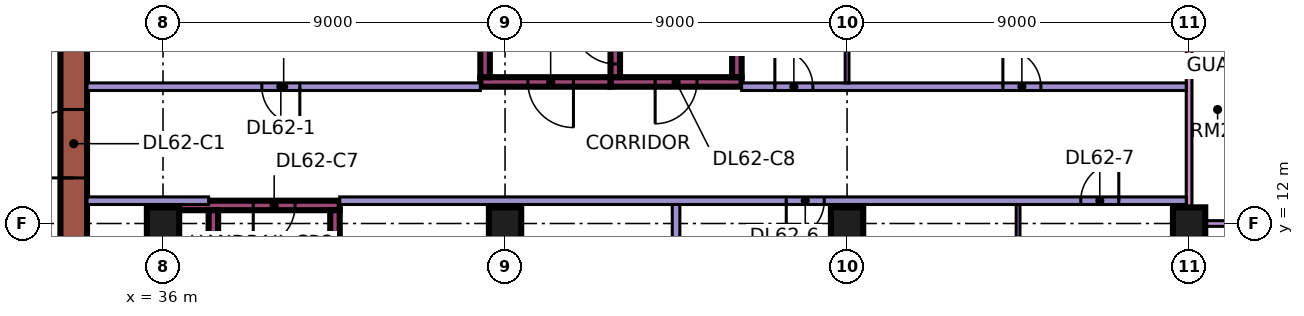
"""IFC4 building model, lengths in metres.
Left out: names, types, materials, properties, quantities, classifications, styles, units other than length and angle.
Written with IfcOpenShell. Run it as: python <this file> out.ifc"""

import sys

from ifc_helpers import new_model, si_unit, direction, frame, frame_2d, origin, origin_2d, place, context, subcontext, project, spatial, rectangle, extrude, element, fill, save


model = new_model("IFC4")
c1 = context("Model", 3, precision=1e-05, world=origin(), true_north=direction((0.0, 1.0)))
c2 = subcontext(c1, "Body", "Model", "MODEL_VIEW")
j1 = project(units=[si_unit("LENGTHUNIT", "METRE"), si_unit("PLANEANGLEUNIT", "RADIAN")], contexts=[c1])
p1 = place(None, origin())
s1 = spatial("IfcSite", under=j1, at=p1, CompositionType="ELEMENT")
p2 = place(p1, origin())
s2 = spatial("IfcBuilding", under=s1, at=p2, CompositionType="ELEMENT")
p3 = place(p2, frame((0.0, 0.0, 262.15)))
s3 = spatial("IfcBuildingStorey", under=s2, at=p3, CompositionType="ELEMENT", Elevation=262.15)
for number, where, z_axis, x_axis in (
    (1, (36.0, 12.0, 0.0), (0.0, 0.0, 1.0), (1.0, 0.0, 0.0)),
    (2, (45.0, 12.0, 0.0), (0.0, 0.0, 1.0), (1.0, 0.0, 0.0)),
    (3, (54.0, 12.0, 0.0), (0.0, 0.0, 1.0), (1.0, 0.0, 0.0)),
    (4, (63.0, 12.0, 0.0), (0.0, 0.0, 1.0), (1.0, 0.0, 0.0)),
):
    element("IfcColumn", number, at=place(p3, frame(where, z_axis=z_axis, x_axis=x_axis)), inside=s3, PredefinedType="COLUMN", context=c2, shape_type="SweptSolid", body=[
        extrude(rectangle(XDim=0.85, YDim=0.85, at=origin_2d()), origin(), (0.0, 0.0, 1.0), 11.25),
    ])
p4 = place(p3, frame((33.65, 7.7, 0.0), z_axis=(0.0, 0.0, 1.0), x_axis=(0.0, 1.0, 0.0)))
e5 = element("IfcWall", 5, at=p4, inside=s3, PredefinedType="SHEAR", context=c2, shape_type="SweptSolid", body=[
    extrude(rectangle(XDim=11.6, YDim=0.7, at=frame_2d((5.8, 0.0))), origin(), (0.0, 0.0, 1.0), 11.25),
])
p5 = place(p4, frame((5.5, 0.0, 0.0)))
e6 = element("IfcOpeningElement", 6, at=p5, cuts=e5, PredefinedType="OPENING", context=c2, shape_type="SweptSolid", body=[
    extrude(rectangle(XDim=1.8, YDim=2.4, at=frame_2d((0.9, 1.2))), frame((0.0, 0.36, 0.0), z_axis=(0.0, -1.0, 0.0), x_axis=(1.0, 0.0, 0.0)), (0.0, 0.0, 1.0), 0.72),
])
p6 = place(p3, frame((36.425, 12.475, 0.0), z_axis=(0.0, 0.0, 1.0), x_axis=(1.0, 0.0, 0.0)))
e7 = element("IfcWall", 7, at=p6, inside=s3, PredefinedType="SHEAR", context=c2, shape_type="SweptSolid", body=[
    extrude(rectangle(XDim=4.225, YDim=0.25, at=frame_2d((2.112, 0.0))), origin(), (0.0, 0.0, 1.0), 11.25),
])
p7 = place(p6, frame((1.95, 0.0, 0.0)))
e8 = element("IfcOpeningElement", 8, at=p7, cuts=e7, PredefinedType="OPENING", context=c2, shape_type="SweptSolid", body=[
    extrude(rectangle(XDim=1.1, YDim=2.2, at=frame_2d((0.55, 1.1))), frame((0.0, 0.135, 0.0), z_axis=(0.0, -1.0, 0.0), x_axis=(1.0, 0.0, 0.0)), (0.0, 0.0, 1.0), 0.27),
])
for number, where, z_axis, x_axis in (
    (9, (37.325, 5.85, 0.0), (0.0, 0.0, 1.0), (0.0, 1.0, 0.0)),
    (10, (40.525, 5.85, 0.0), (0.0, 0.0, 1.0), (0.0, 1.0, 0.0)),
):
    element("IfcWall", number, at=place(p3, frame(where, z_axis=z_axis, x_axis=x_axis)), inside=s3, PredefinedType="SHEAR", context=c2, shape_type="SweptSolid", body=[
        extrude(rectangle(XDim=6.5, YDim=0.25, at=frame_2d((3.25, 0.0))), origin(), (0.0, 0.0, 1.0), 11.25),
    ])
p8 = place(p3, frame((47.775, 15.725, 0.0), z_axis=(0.0, 0.0, 1.0), x_axis=(1.0, 0.0, 0.0)))
e11 = element("IfcWall", 11, at=p8, inside=s3, PredefinedType="SHEAR", context=c2, shape_type="SweptSolid", body=[
    extrude(rectangle(XDim=3.45, YDim=0.25, at=frame_2d((1.725, 0.0))), origin(), (0.0, 0.0, 1.0), 11.25),
])
p9 = place(p8, frame((1.175, 0.0, 0.0)))
e12 = element("IfcOpeningElement", 12, at=p9, cuts=e11, PredefinedType="OPENING", context=c2, shape_type="SweptSolid", body=[
    extrude(rectangle(XDim=1.1, YDim=2.2, at=frame_2d((0.55, 1.1))), frame((0.0, 0.135, 0.0), z_axis=(0.0, -1.0, 0.0), x_axis=(1.0, 0.0, 0.0)), (0.0, 0.0, 1.0), 0.27),
])
p10 = place(p3, frame((47.9, 15.85, 0.0), z_axis=(0.0, 0.0, 1.0), x_axis=(0.0, 1.0, 0.0)))
e13 = element("IfcWall", 13, at=p10, inside=s3, PredefinedType="SHEAR", context=c2, shape_type="SweptSolid", body=[
    extrude(rectangle(XDim=6.5, YDim=0.25, at=frame_2d((3.25, 0.0))), origin(), (0.0, 0.0, 1.0), 11.25),
])
p11 = place(p10, frame((0.35, 0.0, 0.0)))
e14 = element("IfcOpeningElement", 14, at=p11, cuts=e13, PredefinedType="OPENING", context=c2, shape_type="SweptSolid", body=[
    extrude(rectangle(XDim=1.1, YDim=2.2, at=frame_2d((0.55, 1.1))), frame((0.0, 0.135, 0.0), z_axis=(0.0, -1.0, 0.0), x_axis=(1.0, 0.0, 0.0)), (0.0, 0.0, 1.0), 0.27),
])
p12 = place(p3, frame((51.1, 15.85, 0.0), z_axis=(0.0, 0.0, 1.0), x_axis=(0.0, 1.0, 0.0)))
e15 = element("IfcWall", 15, at=p12, inside=s3, PredefinedType="SHEAR", context=c2, shape_type="SweptSolid", body=[
    extrude(rectangle(XDim=6.5, YDim=0.25, at=frame_2d((3.25, 0.0))), origin(), (0.0, 0.0, 1.0), 11.25),
])
p13 = place(p3, frame((44.35, 15.725, 0.0), z_axis=(0.0, 0.0, 1.0), x_axis=(1.0, 0.0, 0.0)))
e16 = element("IfcWall", 16, at=p13, inside=s3, PredefinedType="SHEAR", context=c2, shape_type="SweptSolid", body=[
    extrude(rectangle(XDim=3.425, YDim=0.25, at=frame_2d((1.712, 0.0))), origin(), (0.0, 0.0, 1.0), 11.25),
])
p14 = place(p13, frame((1.25, 0.0, 0.0)))
e17 = element("IfcOpeningElement", 17, at=p14, cuts=e16, PredefinedType="OPENING", context=c2, shape_type="SweptSolid", body=[
    extrude(rectangle(XDim=1.2, YDim=2.2, at=frame_2d((0.6, 1.1))), frame((0.0, 0.135, 0.0), z_axis=(0.0, -1.0, 0.0), x_axis=(1.0, 0.0, 0.0)), (0.0, 0.0, 1.0), 0.27),
])
p15 = place(p3, frame((44.475, 15.85, 0.0), z_axis=(0.0, 0.0, 1.0), x_axis=(0.0, 1.0, 0.0)))
e18 = element("IfcWall", 18, at=p15, inside=s3, PredefinedType="SHEAR", context=c2, shape_type="SweptSolid", body=[
    extrude(rectangle(XDim=6.5, YDim=0.25, at=frame_2d((3.25, 0.0))), origin(), (0.0, 0.0, 1.0), 11.25),
])
p16 = place(p15, frame((1.75, 0.0, 0.0)))
e19 = element("IfcOpeningElement", 19, at=p16, cuts=e18, PredefinedType="OPENING", context=c2, shape_type="SweptSolid", body=[
    extrude(rectangle(XDim=1.1, YDim=2.2, at=frame_2d((0.55, 1.1))), frame((0.0, 0.135, 0.0), z_axis=(0.0, -1.0, 0.0), x_axis=(1.0, 0.0, 0.0)), (0.0, 0.0, 1.0), 0.27),
])
p17 = place(p15, frame((4.3, 0.0, 0.0)))
e20 = element("IfcOpeningElement", 20, at=p17, cuts=e18, PredefinedType="OPENING", context=c2, shape_type="SweptSolid", body=[
    extrude(rectangle(XDim=1.1, YDim=2.2, at=frame_2d((0.55, 1.1))), frame((0.0, 0.135, 0.0), z_axis=(0.0, -1.0, 0.0), x_axis=(1.0, 0.0, 0.0)), (0.0, 0.0, 1.0), 0.27),
])
p18 = place(p3, frame((63.0, 12.075, 0.0), z_axis=(0.0, 0.0, 1.0), x_axis=(0.0, 1.0, 0.0)))
e21 = element("IfcWall", 21, at=p18, inside=s3, PredefinedType="SOLIDWALL", context=c2, shape_type="SweptSolid", body=[
    extrude(rectangle(XDim=10.35, YDim=0.15, at=frame_2d((5.175, 0.0))), origin(), (0.0, 0.0, 1.0), 10.85),
])
p19 = place(p18, frame((5.438, 0.0, 0.45)))
e22 = element("IfcOpeningElement", 22, at=p19, cuts=e21, PredefinedType="OPENING", context=c2, shape_type="SweptSolid", body=[
    extrude(rectangle(XDim=3.0, YDim=9.8, at=frame_2d((1.5, 4.9))), frame((0.0, 0.085, 0.0), z_axis=(0.0, -1.0, 0.0), x_axis=(1.0, 0.0, 0.0)), (0.0, 0.0, 1.0), 0.17),
])
p20 = place(p3, frame((64.5, 12.0, 0.0), z_axis=(0.0, 0.0, 1.0), x_axis=(-1.0, 0.0, 0.0)))
e23 = element("IfcWall", 23, at=p20, inside=s3, PredefinedType="SOLIDWALL", context=c2, shape_type="SweptSolid", body=[
    extrude(rectangle(XDim=1.5, YDim=0.15, at=frame_2d((0.75, 0.0))), origin(), (0.0, 0.0, 1.0), 10.85),
])
p21 = place(p3, frame((34.0, 12.6, 0.0), z_axis=(0.0, 0.0, 1.0), x_axis=(1.0, 0.0, 0.0)))
e24 = element("IfcWall", 24, at=p21, inside=s3, PredefinedType="PARTITIONING", context=c2, shape_type="SweptSolid", body=[
    extrude(rectangle(XDim=3.2, YDim=0.2, at=frame_2d((1.6, 0.0))), origin(), (0.0, 0.0, 1.0), 10.85),
])
p22 = place(p3, frame((34.0, 15.6, 0.0), z_axis=(0.0, 0.0, 1.0), x_axis=(1.0, 0.0, 0.0)))
e25 = element("IfcWall", 25, at=p22, inside=s3, PredefinedType="PARTITIONING", context=c2, shape_type="SweptSolid", body=[
    extrude(rectangle(XDim=10.35, YDim=0.2, at=frame_2d((5.175, 0.0))), origin(), (0.0, 0.0, 1.0), 10.85),
])
p23 = place(p22, frame((4.6, 0.0, 0.0)))
e26 = element("IfcOpeningElement", 26, at=p23, cuts=e25, PredefinedType="OPENING", context=c2, shape_type="SweptSolid", body=[
    extrude(rectangle(XDim=1.0, YDim=2.1, at=frame_2d((0.5, 1.05))), frame((0.0, 0.11, 0.0), z_axis=(0.0, -1.0, 0.0), x_axis=(1.0, 0.0, 0.0)), (0.0, 0.0, 1.0), 0.22),
])
p24 = place(p3, frame((40.65, 12.6, 0.0), z_axis=(0.0, 0.0, 1.0), x_axis=(1.0, 0.0, 0.0)))
e27 = element("IfcWall", 27, at=p24, inside=s3, PredefinedType="PARTITIONING", context=c2, shape_type="SweptSolid", body=[
    extrude(rectangle(XDim=22.276, YDim=0.2, at=frame_2d((11.138, 0.0))), origin(), (0.0, 0.0, 1.0), 10.85),
])
p25 = place(p24, frame((11.75, 0.0, 0.0)))
e28 = element("IfcOpeningElement", 28, at=p25, cuts=e27, PredefinedType="OPENING", context=c2, shape_type="SweptSolid", body=[
    extrude(rectangle(XDim=1.0, YDim=2.1, at=frame_2d((0.5, 1.05))), frame((0.0, 0.11, 0.0), z_axis=(0.0, -1.0, 0.0), x_axis=(1.0, 0.0, 0.0)), (0.0, 0.0, 1.0), 0.22),
])
p26 = place(p24, frame((19.5, 0.0, 0.0)))
e29 = element("IfcOpeningElement", 29, at=p26, cuts=e27, PredefinedType="OPENING", context=c2, shape_type="SweptSolid", body=[
    extrude(rectangle(XDim=1.0, YDim=2.1, at=frame_2d((0.5, 1.05))), frame((0.0, 0.11, 0.0), z_axis=(0.0, -1.0, 0.0), x_axis=(1.0, 0.0, 0.0)), (0.0, 0.0, 1.0), 0.22),
])
p27 = place(p3, frame((49.5, 0.0, 0.0), z_axis=(0.0, 0.0, 1.0), x_axis=(0.0, 1.0, 0.0)))
e30 = element("IfcWall", 30, at=p27, inside=s3, PredefinedType="PARTITIONING", context=c2, shape_type="SweptSolid", body=[
    extrude(rectangle(XDim=12.5, YDim=0.2, at=frame_2d((6.25, 0.0))), origin(), (0.0, 0.0, 1.0), 10.85),
])
p28 = place(p27, frame((5.9, 0.0, 0.0)))
e31 = element("IfcOpeningElement", 31, at=p28, cuts=e30, PredefinedType="OPENING", context=c2, shape_type="SweptSolid", body=[
    extrude(rectangle(XDim=1.0, YDim=2.1, at=frame_2d((0.5, 1.05))), frame((0.0, 0.11, 0.0), z_axis=(0.0, -1.0, 0.0), x_axis=(1.0, 0.0, 0.0)), (0.0, 0.0, 1.0), 0.22),
])
p29 = place(p3, frame((51.225, 15.6, 0.0), z_axis=(0.0, 0.0, 1.0), x_axis=(1.0, 0.0, 0.0)))
e32 = element("IfcWall", 32, at=p29, inside=s3, PredefinedType="PARTITIONING", context=c2, shape_type="SweptSolid", body=[
    extrude(rectangle(XDim=11.701, YDim=0.2, at=frame_2d((5.851, 0.0))), origin(), (0.0, 0.0, 1.0), 10.85),
])
p30 = place(p29, frame((0.875, 0.0, 0.0)))
e33 = element("IfcOpeningElement", 33, at=p30, cuts=e32, PredefinedType="OPENING", context=c2, shape_type="SweptSolid", body=[
    extrude(rectangle(XDim=1.0, YDim=2.1, at=frame_2d((0.5, 1.05))), frame((0.0, 0.11, 0.0), z_axis=(0.0, -1.0, 0.0), x_axis=(1.0, 0.0, 0.0)), (0.0, 0.0, 1.0), 0.22),
])
p31 = place(p29, frame((6.875, 0.0, 0.0)))
e34 = element("IfcOpeningElement", 34, at=p31, cuts=e32, PredefinedType="OPENING", context=c2, shape_type="SweptSolid", body=[
    extrude(rectangle(XDim=1.0, YDim=2.1, at=frame_2d((0.5, 1.05))), frame((0.0, 0.11, 0.0), z_axis=(0.0, -1.0, 0.0), x_axis=(1.0, 0.0, 0.0)), (0.0, 0.0, 1.0), 0.22),
])
p32 = place(p3, frame((54.0, 15.7, 0.0), z_axis=(0.0, 0.0, 1.0), x_axis=(0.0, 1.0, 0.0)))
e35 = element("IfcWall", 35, at=p32, inside=s3, PredefinedType="PARTITIONING", context=c2, shape_type="SweptSolid", body=[
    extrude(rectangle(XDim=8.3, YDim=0.1, at=frame_2d((4.15, 0.0))), origin(), (0.0, 0.0, 1.0), 10.85),
])
p33 = place(p3, frame((58.5, 0.0, 0.0), z_axis=(0.0, 0.0, 1.0), x_axis=(0.0, 1.0, 0.0)))
e36 = element("IfcWall", 36, at=p33, inside=s3, PredefinedType="PARTITIONING", context=c2, shape_type="SweptSolid", body=[
    extrude(rectangle(XDim=12.5, YDim=0.1, at=frame_2d((6.25, 0.0))), origin(), (0.0, 0.0, 1.0), 10.85),
])
p34 = place(p5, origin())
e37 = element("IfcDoor", 37, at=p34, inside=s3, OperationType="DOUBLE_DOOR_SINGLE_SWING", PredefinedType="DOOR", context=c2, shape_type="SweptSolid", body=[
    extrude(rectangle(XDim=1.8, YDim=2.4, at=frame_2d((0.9, 1.2))), frame((0.0, 0.025, 0.0), z_axis=(0.0, -1.0, 0.0), x_axis=(1.0, 0.0, 0.0)), (0.0, 0.0, 1.0), 0.05),
])
fill(e6, e37)
p35 = place(p7, frame((1.1, 0.0, 0.0), z_axis=(0.0, 0.0, 1.0), x_axis=(-1.0, 0.0, 0.0)))
e38 = element("IfcDoor", 38, at=p35, inside=s3, OperationType="SINGLE_SWING_LEFT", PredefinedType="DOOR", context=c2, shape_type="SweptSolid", body=[
    extrude(rectangle(XDim=1.1, YDim=2.2, at=frame_2d((0.55, 1.1))), frame((0.0, 0.025, 0.0), z_axis=(0.0, -1.0, 0.0), x_axis=(1.0, 0.0, 0.0)), (0.0, 0.0, 1.0), 0.05),
])
fill(e8, e38)
p36 = place(p9, frame((1.1, 0.0, 0.0), z_axis=(0.0, 0.0, 1.0), x_axis=(-1.0, 0.0, 0.0)))
e39 = element("IfcDoor", 39, at=p36, inside=s3, OperationType="SINGLE_SWING_LEFT", PredefinedType="DOOR", context=c2, shape_type="SweptSolid", body=[
    extrude(rectangle(XDim=1.1, YDim=2.2, at=frame_2d((0.55, 1.1))), frame((0.0, 0.025, 0.0), z_axis=(0.0, -1.0, 0.0), x_axis=(1.0, 0.0, 0.0)), (0.0, 0.0, 1.0), 0.05),
])
fill(e12, e39)
p37 = place(p14, origin())
e40 = element("IfcDoor", 40, at=p37, inside=s3, OperationType="SINGLE_SWING_RIGHT", PredefinedType="DOOR", context=c2, shape_type="SweptSolid", body=[
    extrude(rectangle(XDim=1.2, YDim=2.2, at=frame_2d((0.6, 1.1))), frame((0.0, 0.025, 0.0), z_axis=(0.0, -1.0, 0.0), x_axis=(1.0, 0.0, 0.0)), (0.0, 0.0, 1.0), 0.05),
])
fill(e17, e40)
p38 = place(p11, frame((1.1, 0.0, 0.0), z_axis=(0.0, 0.0, 1.0), x_axis=(-1.0, 0.0, 0.0)))
e41 = element("IfcDoor", 41, at=p38, inside=s3, OperationType="SINGLE_SWING_RIGHT", PredefinedType="DOOR", context=c2, shape_type="SweptSolid", body=[
    extrude(rectangle(XDim=1.1, YDim=2.2, at=frame_2d((0.55, 1.1))), frame((0.0, 0.025, 0.0), z_axis=(0.0, -1.0, 0.0), x_axis=(1.0, 0.0, 0.0)), (0.0, 0.0, 1.0), 0.05),
])
fill(e14, e41)
p39 = place(p23, origin())
e42 = element("IfcDoor", 42, at=p39, inside=s3, OperationType="SINGLE_SWING_RIGHT", PredefinedType="DOOR", context=c2, shape_type="SweptSolid", body=[
    extrude(rectangle(XDim=1.0, YDim=2.1, at=frame_2d((0.5, 1.05))), frame((0.0, 0.025, 0.0), z_axis=(0.0, -1.0, 0.0), x_axis=(1.0, 0.0, 0.0)), (0.0, 0.0, 1.0), 0.05),
])
fill(e26, e42)
p40 = place(p30, origin())
e43 = element("IfcDoor", 43, at=p40, inside=s3, OperationType="SINGLE_SWING_LEFT", PredefinedType="DOOR", context=c2, shape_type="SweptSolid", body=[
    extrude(rectangle(XDim=1.0, YDim=2.1, at=frame_2d((0.5, 1.05))), frame((0.0, 0.025, 0.0), z_axis=(0.0, -1.0, 0.0), x_axis=(1.0, 0.0, 0.0)), (0.0, 0.0, 1.0), 0.05),
])
fill(e33, e43)
p41 = place(p31, origin())
e44 = element("IfcDoor", 44, at=p41, inside=s3, OperationType="SINGLE_SWING_LEFT", PredefinedType="DOOR", context=c2, shape_type="SweptSolid", body=[
    extrude(rectangle(XDim=1.0, YDim=2.1, at=frame_2d((0.5, 1.05))), frame((0.0, 0.025, 0.0), z_axis=(0.0, -1.0, 0.0), x_axis=(1.0, 0.0, 0.0)), (0.0, 0.0, 1.0), 0.05),
])
fill(e34, e44)
p42 = place(p25, frame((1.0, 0.0, 0.0), z_axis=(0.0, 0.0, 1.0), x_axis=(-1.0, 0.0, 0.0)))
e45 = element("IfcDoor", 45, at=p42, inside=s3, OperationType="SINGLE_SWING_LEFT", PredefinedType="DOOR", context=c2, shape_type="SweptSolid", body=[
    extrude(rectangle(XDim=1.0, YDim=2.1, at=frame_2d((0.5, 1.05))), frame((0.0, 0.025, 0.0), z_axis=(0.0, -1.0, 0.0), x_axis=(1.0, 0.0, 0.0)), (0.0, 0.0, 1.0), 0.05),
])
fill(e28, e45)
p43 = place(p26, frame((1.0, 0.0, 0.0), z_axis=(0.0, 0.0, 1.0), x_axis=(-1.0, 0.0, 0.0)))
e46 = element("IfcDoor", 46, at=p43, inside=s3, OperationType="SINGLE_SWING_RIGHT", PredefinedType="DOOR", context=c2, shape_type="SweptSolid", body=[
    extrude(rectangle(XDim=1.0, YDim=2.1, at=frame_2d((0.5, 1.05))), frame((0.0, 0.025, 0.0), z_axis=(0.0, -1.0, 0.0), x_axis=(1.0, 0.0, 0.0)), (0.0, 0.0, 1.0), 0.05),
])
fill(e29, e46)
save(model, sys.argv[1])
